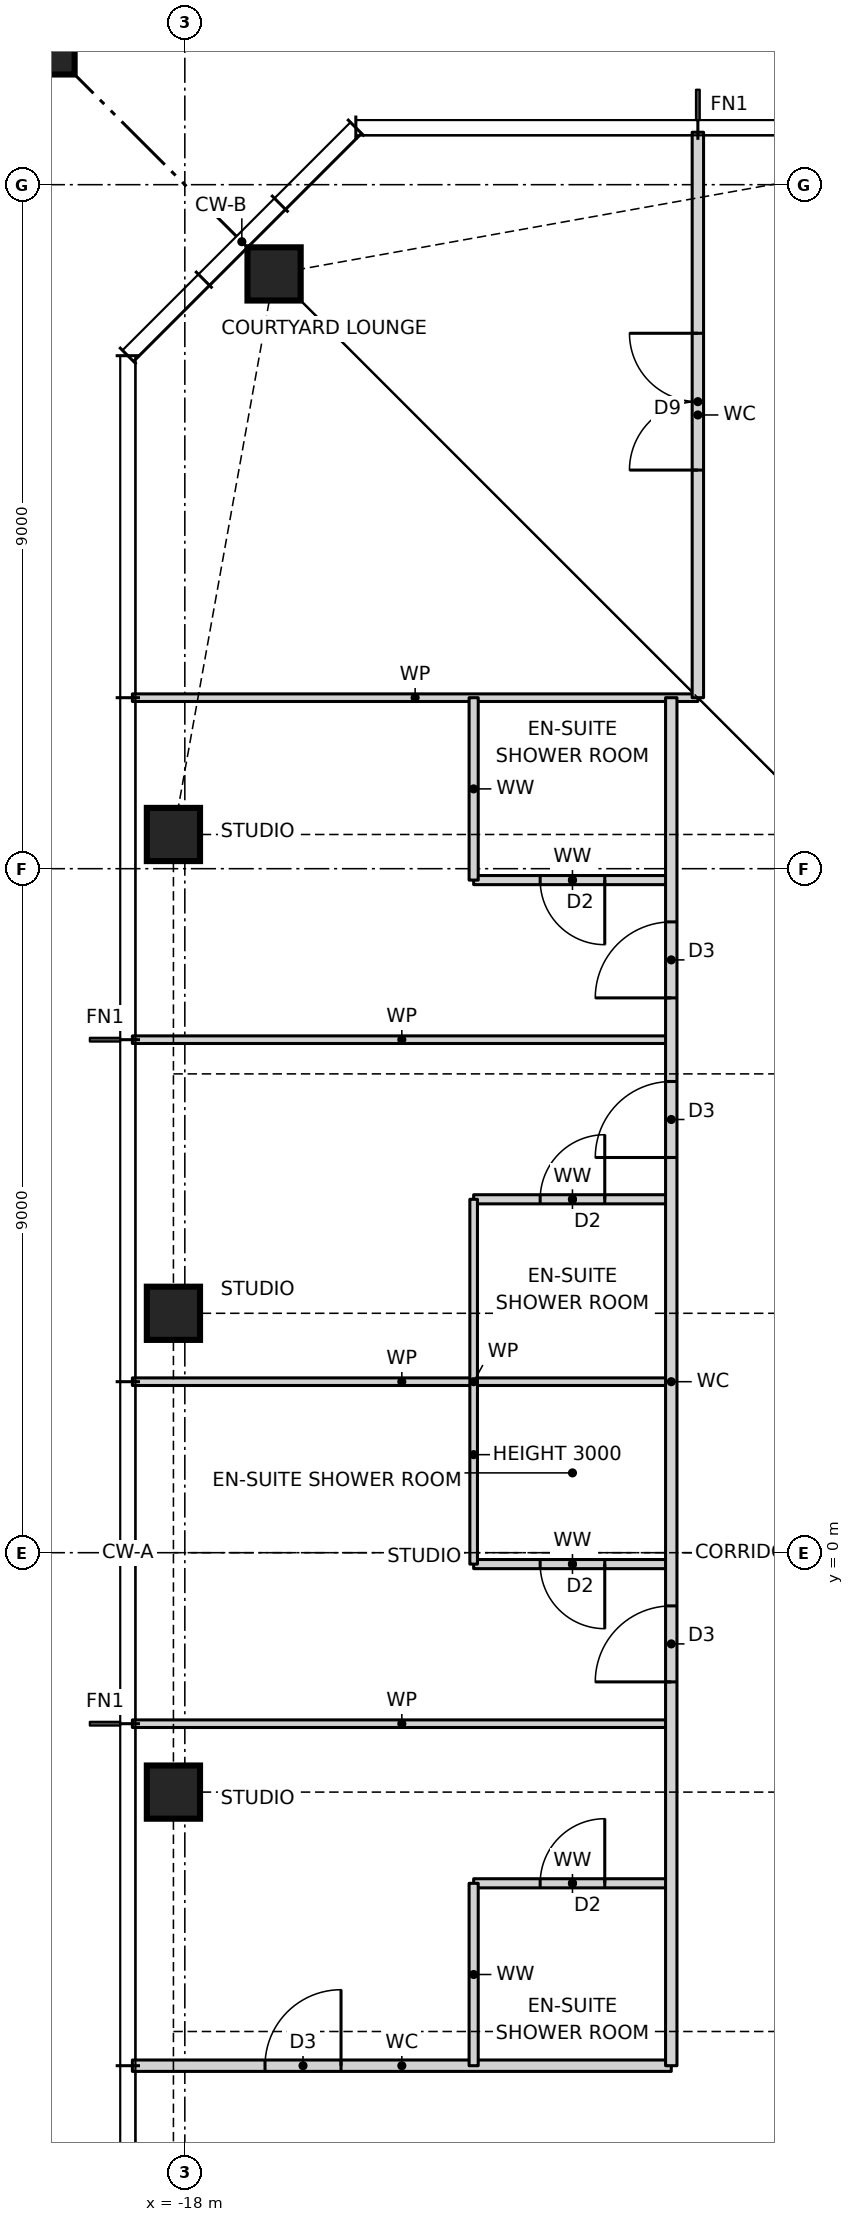
"""IFC4 building model, lengths in metres.
Left out: names, types, materials, properties, quantities, classifications, styles, units other than length and angle.
Written with IfcOpenShell. Run it as: python <this file> out.ifc"""

import sys

from ifc_helpers import new_model, si_unit, direction, frame, frame_2d, origin, origin_2d, place, context, subcontext, project, spatial, rectangle, hollow_rectangle, i_section, extrude, element, fill, save


model = new_model("IFC4")
c1 = context("Model", 3, precision=1e-05, world=origin(), true_north=direction((0.0, 1.0)))
c2 = subcontext(c1, "Body", "Model", "MODEL_VIEW")
j1 = project(units=[si_unit("LENGTHUNIT", "METRE"), si_unit("PLANEANGLEUNIT", "RADIAN")], contexts=[c1])
p1 = place(None, origin())
s1 = spatial("IfcSite", under=j1, at=p1, CompositionType="ELEMENT")
p2 = place(p1, origin())
s2 = spatial("IfcBuilding", under=s1, at=p2, CompositionType="ELEMENT")
p3 = place(p2, frame((0.0, 0.0, 160.0)))
s3 = spatial("IfcBuildingStorey", under=s2, at=p3, CompositionType="ELEMENT", Elevation=160.0)
for number, where, z_axis, x_axis in (
    (1, (-16.826, 16.826, 0.0), (0.0, 0.0, 1.0), (1.0, 0.0, 0.0)),
    (2, (-18.15, 9.45, 0.0), (0.0, 0.0, 1.0), (1.0, 0.0, 0.0)),
    (3, (-18.15, 3.15, 0.0), (0.0, 0.0, 1.0), (1.0, 0.0, 0.0)),
    (4, (-18.15, -3.15, 0.0), (0.0, 0.0, 1.0), (1.0, 0.0, 0.0)),
):
    element("IfcColumn", number, at=place(p3, frame(where, z_axis=z_axis, x_axis=x_axis)), inside=s3, PredefinedType="COLUMN", context=c2, shape_type="SweptSolid", body=[
        extrude(hollow_rectangle(XDim=0.7, YDim=0.7, WallThickness=0.06, at=origin_2d()), origin(), (0.0, 0.0, 1.0), 3.5),
    ])
p4 = place(p3, frame((-21.65, 21.65, 0.0), z_axis=(0.0, 0.0, 1.0), x_axis=(1.0, 0.0, 0.0)))
e5 = element("IfcColumn", 5, at=p4, inside=s3, PredefinedType="COLUMN", context=c2, shape_type="SweptSolid", body=[
    extrude(rectangle(XDim=4.4, YDim=4.4, at=origin_2d()), origin(), (0.0, 0.0, 1.0), 3.5),
    extrude(i_section(OverallWidth=0.478, OverallDepth=0.599, WebThickness=0.1, FlangeThickness=0.14, at=origin_2d()), origin(), (0.0, 0.0, 1.0), 3.5),
])
p5 = place(p3, frame((-18.69, -6.75, 0.0), z_axis=(0.0, 0.0, 1.0), x_axis=(1.0, 0.0, 0.0)))
e6 = element("IfcWall", 6, at=p5, inside=s3, PredefinedType="PARTITIONING", context=c2, shape_type="SweptSolid", body=[
    extrude(rectangle(XDim=7.09, YDim=0.15, at=frame_2d((3.545, 0.0))), origin(), (0.0, 0.0, 1.0), 3.27),
])
p6 = place(p5, frame((1.745, 0.0, 0.0)))
e7 = element("IfcOpeningElement", 7, at=p6, cuts=e6, PredefinedType="OPENING", context=c2, shape_type="SweptSolid", body=[
    extrude(rectangle(XDim=1.0, YDim=2.1, at=frame_2d((0.5, 1.05))), frame((0.0, 0.085, 0.0), z_axis=(0.0, -1.0, 0.0), x_axis=(1.0, 0.0, 0.0)), (0.0, 0.0, 1.0), 0.17),
])
p7 = place(p3, frame((-14.2, -4.35, 0.0), z_axis=(0.0, 0.0, 1.0), x_axis=(1.0, 0.0, 0.0)))
e8 = element("IfcWall", 8, at=p7, inside=s3, PredefinedType="PARTITIONING", context=c2, shape_type="SweptSolid", body=[
    extrude(rectangle(XDim=2.6, YDim=0.12, at=frame_2d((1.3, 0.0))), origin(), (0.0, 0.0, 1.0), 3.27),
])
p8 = place(p7, frame((0.875, 0.0, 0.0)))
e9 = element("IfcOpeningElement", 9, at=p8, cuts=e8, PredefinedType="OPENING", context=c2, shape_type="SweptSolid", body=[
    extrude(rectangle(XDim=0.85, YDim=2.1, at=frame_2d((0.425, 1.05))), frame((0.0, 0.07, 0.0), z_axis=(0.0, -1.0, 0.0), x_axis=(1.0, 0.0, 0.0)), (0.0, 0.0, 1.0), 0.14),
])
p9 = place(p3, frame((-18.69, -2.25, 0.0), z_axis=(0.0, 0.0, 1.0), x_axis=(1.0, 0.0, 0.0)))
e10 = element("IfcWall", 10, at=p9, inside=s3, PredefinedType="PARTITIONING", context=c2, shape_type="SweptSolid", body=[
    extrude(rectangle(XDim=7.09, YDim=0.1, at=frame_2d((3.545, 0.0))), origin(), (0.0, 0.0, 1.0), 3.27),
])
p10 = place(p3, frame((-14.2, -0.15, 0.0), z_axis=(0.0, 0.0, 1.0), x_axis=(1.0, 0.0, 0.0)))
e11 = element("IfcWall", 11, at=p10, inside=s3, PredefinedType="PARTITIONING", context=c2, shape_type="SweptSolid", body=[
    extrude(rectangle(XDim=2.6, YDim=0.12, at=frame_2d((1.3, 0.0))), origin(), (0.0, 0.0, 1.0), 3.27),
])
p11 = place(p10, frame((0.875, 0.0, 0.0)))
e12 = element("IfcOpeningElement", 12, at=p11, cuts=e11, PredefinedType="OPENING", context=c2, shape_type="SweptSolid", body=[
    extrude(rectangle(XDim=0.85, YDim=2.1, at=frame_2d((0.425, 1.05))), frame((0.0, 0.07, 0.0), z_axis=(0.0, -1.0, 0.0), x_axis=(1.0, 0.0, 0.0)), (0.0, 0.0, 1.0), 0.14),
])
p12 = place(p3, frame((-18.69, 2.25, 0.0), z_axis=(0.0, 0.0, 1.0), x_axis=(1.0, 0.0, 0.0)))
e13 = element("IfcWall", 13, at=p12, inside=s3, PredefinedType="PARTITIONING", context=c2, shape_type="SweptSolid", body=[
    extrude(rectangle(XDim=7.09, YDim=0.1, at=frame_2d((3.545, 0.0))), origin(), (0.0, 0.0, 1.0), 3.27),
])
p13 = place(p3, frame((-14.2, 4.65, 0.0), z_axis=(0.0, 0.0, 1.0), x_axis=(1.0, 0.0, 0.0)))
e14 = element("IfcWall", 14, at=p13, inside=s3, PredefinedType="PARTITIONING", context=c2, shape_type="SweptSolid", body=[
    extrude(rectangle(XDim=2.6, YDim=0.12, at=frame_2d((1.3, 0.0))), origin(), (0.0, 0.0, 1.0), 3.27),
])
p14 = place(p13, frame((0.875, 0.0, 0.0)))
e15 = element("IfcOpeningElement", 15, at=p14, cuts=e14, PredefinedType="OPENING", context=c2, shape_type="SweptSolid", body=[
    extrude(rectangle(XDim=0.85, YDim=2.1, at=frame_2d((0.425, 1.05))), frame((0.0, 0.07, 0.0), z_axis=(0.0, -1.0, 0.0), x_axis=(1.0, 0.0, 0.0)), (0.0, 0.0, 1.0), 0.14),
])
p15 = place(p3, frame((-18.69, 6.75, 0.0), z_axis=(0.0, 0.0, 1.0), x_axis=(1.0, 0.0, 0.0)))
e16 = element("IfcWall", 16, at=p15, inside=s3, PredefinedType="PARTITIONING", context=c2, shape_type="SweptSolid", body=[
    extrude(rectangle(XDim=7.09, YDim=0.1, at=frame_2d((3.545, 0.0))), origin(), (0.0, 0.0, 1.0), 3.27),
])
p16 = place(p3, frame((-14.2, 8.85, 0.0), z_axis=(0.0, 0.0, 1.0), x_axis=(1.0, 0.0, 0.0)))
e17 = element("IfcWall", 17, at=p16, inside=s3, PredefinedType="PARTITIONING", context=c2, shape_type="SweptSolid", body=[
    extrude(rectangle(XDim=2.6, YDim=0.12, at=frame_2d((1.3, 0.0))), origin(), (0.0, 0.0, 1.0), 3.27),
])
p17 = place(p16, frame((0.875, 0.0, 0.0)))
e18 = element("IfcOpeningElement", 18, at=p17, cuts=e17, PredefinedType="OPENING", context=c2, shape_type="SweptSolid", body=[
    extrude(rectangle(XDim=0.85, YDim=2.1, at=frame_2d((0.425, 1.05))), frame((0.0, 0.07, 0.0), z_axis=(0.0, -1.0, 0.0), x_axis=(1.0, 0.0, 0.0)), (0.0, 0.0, 1.0), 0.14),
])
p18 = place(p3, frame((-18.69, 11.25, 0.0), z_axis=(0.0, 0.0, 1.0), x_axis=(1.0, 0.0, 0.0)))
e19 = element("IfcWall", 19, at=p18, inside=s3, PredefinedType="PARTITIONING", context=c2, shape_type="SweptSolid", body=[
    extrude(rectangle(XDim=7.44, YDim=0.1, at=frame_2d((3.72, 0.0))), origin(), (0.0, 0.0, 1.0), 3.27),
])
p19 = place(p3, frame((-11.25, 11.25, 0.0), z_axis=(0.0, 0.0, 1.0), x_axis=(0.0, 1.0, 0.0)))
e20 = element("IfcWall", 20, at=p19, inside=s3, PredefinedType="PARTITIONING", context=c2, shape_type="SweptSolid", body=[
    extrude(rectangle(XDim=7.44, YDim=0.15, at=frame_2d((3.72, 0.0))), origin(), (0.0, 0.0, 1.0), 3.27),
])
p20 = place(p19, frame((2.995, 0.0, 0.0)))
e21 = element("IfcOpeningElement", 21, at=p20, cuts=e20, PredefinedType="OPENING", context=c2, shape_type="SweptSolid", body=[
    extrude(rectangle(XDim=1.8, YDim=2.1, at=frame_2d((0.9, 1.05))), frame((0.0, 0.085, 0.0), z_axis=(0.0, -1.0, 0.0), x_axis=(1.0, 0.0, 0.0)), (0.0, 0.0, 1.0), 0.17),
])
p21 = place(p3, frame((-11.6, -6.75, 0.0), z_axis=(0.0, 0.0, 1.0), x_axis=(0.0, 1.0, 0.0)))
e22 = element("IfcWall", 22, at=p21, inside=s3, PredefinedType="PARTITIONING", context=c2, shape_type="SweptSolid", body=[
    extrude(rectangle(XDim=18.0, YDim=0.15, at=frame_2d((9.0, 0.0))), origin(), (0.0, 0.0, 1.0), 3.27),
])
p22 = place(p21, frame((14.05, 0.0, 0.0)))
e23 = element("IfcOpeningElement", 23, at=p22, cuts=e22, PredefinedType="OPENING", context=c2, shape_type="SweptSolid", body=[
    extrude(rectangle(XDim=1.0, YDim=2.1, at=frame_2d((0.5, 1.05))), frame((0.0, 0.085, 0.0), z_axis=(0.0, -1.0, 0.0), x_axis=(1.0, 0.0, 0.0)), (0.0, 0.0, 1.0), 0.17),
])
p23 = place(p21, frame((11.95, 0.0, 0.0)))
e24 = element("IfcOpeningElement", 24, at=p23, cuts=e22, PredefinedType="OPENING", context=c2, shape_type="SweptSolid", body=[
    extrude(rectangle(XDim=1.0, YDim=2.1, at=frame_2d((0.5, 1.05))), frame((0.0, 0.085, 0.0), z_axis=(0.0, -1.0, 0.0), x_axis=(1.0, 0.0, 0.0)), (0.0, 0.0, 1.0), 0.17),
])
p24 = place(p21, frame((5.05, 0.0, 0.0)))
e25 = element("IfcOpeningElement", 25, at=p24, cuts=e22, PredefinedType="OPENING", context=c2, shape_type="SweptSolid", body=[
    extrude(rectangle(XDim=1.0, YDim=2.1, at=frame_2d((0.5, 1.05))), frame((0.0, 0.085, 0.0), z_axis=(0.0, -1.0, 0.0), x_axis=(1.0, 0.0, 0.0)), (0.0, 0.0, 1.0), 0.17),
])
p25 = place(p3, frame((-14.2, -6.75, 0.0), z_axis=(0.0, 0.0, 1.0), x_axis=(0.0, 1.0, 0.0)))
e26 = element("IfcWall", 26, at=p25, inside=s3, PredefinedType="PARTITIONING", context=c2, shape_type="SweptSolid", body=[
    extrude(rectangle(XDim=2.4, YDim=0.12, at=frame_2d((1.2, 0.0))), origin(), (0.0, 0.0, 1.0), 3.27),
])
p26 = place(p3, frame((-14.2, -0.15, 0.0), z_axis=(0.0, 0.0, 1.0), x_axis=(0.0, 1.0, 0.0)))
e27 = element("IfcWall", 27, at=p26, inside=s3, PredefinedType="PARTITIONING", context=c2, shape_type="SweptSolid", body=[
    extrude(rectangle(XDim=4.8, YDim=0.1, at=frame_2d((2.4, 0.0))), origin(), (0.0, 0.0, 1.0), 3.0),
])
p27 = place(p3, frame((-14.2, 8.85, 0.0), z_axis=(0.0, 0.0, 1.0), x_axis=(0.0, 1.0, 0.0)))
e28 = element("IfcWall", 28, at=p27, inside=s3, PredefinedType="PARTITIONING", context=c2, shape_type="SweptSolid", body=[
    extrude(rectangle(XDim=2.4, YDim=0.12, at=frame_2d((1.2, 0.0))), origin(), (0.0, 0.0, 1.0), 3.27),
])
p28 = place(p22, origin())
e29 = element("IfcDoor", 29, at=p28, inside=s3, OperationType="SINGLE_SWING_LEFT", PredefinedType="DOOR", context=c2, shape_type="SweptSolid", body=[
    extrude(rectangle(XDim=1.0, YDim=2.1, at=frame_2d((0.5, 1.05))), frame((0.0, 0.025, 0.0), z_axis=(0.0, -1.0, 0.0), x_axis=(1.0, 0.0, 0.0)), (0.0, 0.0, 1.0), 0.05),
])
fill(e23, e29)
p29 = place(p17, frame((0.85, 0.0, 0.0), z_axis=(0.0, 0.0, 1.0), x_axis=(-1.0, 0.0, 0.0)))
e30 = element("IfcDoor", 30, at=p29, inside=s3, OperationType="SINGLE_SWING_LEFT", PredefinedType="DOOR", context=c2, shape_type="SweptSolid", body=[
    extrude(rectangle(XDim=0.85, YDim=2.1, at=frame_2d((0.425, 1.05))), frame((0.0, 0.025, 0.0), z_axis=(0.0, -1.0, 0.0), x_axis=(1.0, 0.0, 0.0)), (0.0, 0.0, 1.0), 0.05),
])
fill(e18, e30)
p30 = place(p23, origin())
e31 = element("IfcDoor", 31, at=p30, inside=s3, OperationType="SINGLE_SWING_LEFT", PredefinedType="DOOR", context=c2, shape_type="SweptSolid", body=[
    extrude(rectangle(XDim=1.0, YDim=2.1, at=frame_2d((0.5, 1.05))), frame((0.0, 0.025, 0.0), z_axis=(0.0, -1.0, 0.0), x_axis=(1.0, 0.0, 0.0)), (0.0, 0.0, 1.0), 0.05),
])
fill(e24, e31)
p31 = place(p14, origin())
e32 = element("IfcDoor", 32, at=p31, inside=s3, OperationType="SINGLE_SWING_RIGHT", PredefinedType="DOOR", context=c2, shape_type="SweptSolid", body=[
    extrude(rectangle(XDim=0.85, YDim=2.1, at=frame_2d((0.425, 1.05))), frame((0.0, 0.025, 0.0), z_axis=(0.0, -1.0, 0.0), x_axis=(1.0, 0.0, 0.0)), (0.0, 0.0, 1.0), 0.05),
])
fill(e15, e32)
p32 = place(p24, origin())
e33 = element("IfcDoor", 33, at=p32, inside=s3, OperationType="SINGLE_SWING_LEFT", PredefinedType="DOOR", context=c2, shape_type="SweptSolid", body=[
    extrude(rectangle(XDim=1.0, YDim=2.1, at=frame_2d((0.5, 1.05))), frame((0.0, 0.025, 0.0), z_axis=(0.0, -1.0, 0.0), x_axis=(1.0, 0.0, 0.0)), (0.0, 0.0, 1.0), 0.05),
])
fill(e25, e33)
p33 = place(p11, frame((0.85, 0.0, 0.0), z_axis=(0.0, 0.0, 1.0), x_axis=(-1.0, 0.0, 0.0)))
e34 = element("IfcDoor", 34, at=p33, inside=s3, OperationType="SINGLE_SWING_LEFT", PredefinedType="DOOR", context=c2, shape_type="SweptSolid", body=[
    extrude(rectangle(XDim=0.85, YDim=2.1, at=frame_2d((0.425, 1.05))), frame((0.0, 0.025, 0.0), z_axis=(0.0, -1.0, 0.0), x_axis=(1.0, 0.0, 0.0)), (0.0, 0.0, 1.0), 0.05),
])
fill(e12, e34)
p34 = place(p6, origin())
e35 = element("IfcDoor", 35, at=p34, inside=s3, OperationType="SINGLE_SWING_RIGHT", PredefinedType="DOOR", context=c2, shape_type="SweptSolid", body=[
    extrude(rectangle(XDim=1.0, YDim=2.1, at=frame_2d((0.5, 1.05))), frame((0.0, 0.025, 0.0), z_axis=(0.0, -1.0, 0.0), x_axis=(1.0, 0.0, 0.0)), (0.0, 0.0, 1.0), 0.05),
])
fill(e7, e35)
p35 = place(p8, origin())
e36 = element("IfcDoor", 36, at=p35, inside=s3, OperationType="SINGLE_SWING_RIGHT", PredefinedType="DOOR", context=c2, shape_type="SweptSolid", body=[
    extrude(rectangle(XDim=0.85, YDim=2.1, at=frame_2d((0.425, 1.05))), frame((0.0, 0.025, 0.0), z_axis=(0.0, -1.0, 0.0), x_axis=(1.0, 0.0, 0.0)), (0.0, 0.0, 1.0), 0.05),
])
fill(e9, e36)
p36 = place(p20, origin())
e37 = element("IfcDoor", 37, at=p36, inside=s3, OperationType="DOUBLE_DOOR_SINGLE_SWING", PredefinedType="DOOR", context=c2, shape_type="SweptSolid", body=[
    extrude(rectangle(XDim=1.8, YDim=2.1, at=frame_2d((0.9, 1.05))), frame((0.0, 0.025, 0.0), z_axis=(0.0, -1.0, 0.0), x_axis=(1.0, 0.0, 0.0)), (0.0, 0.0, 1.0), 0.05),
])
fill(e21, e37)
save(model, sys.argv[1])
